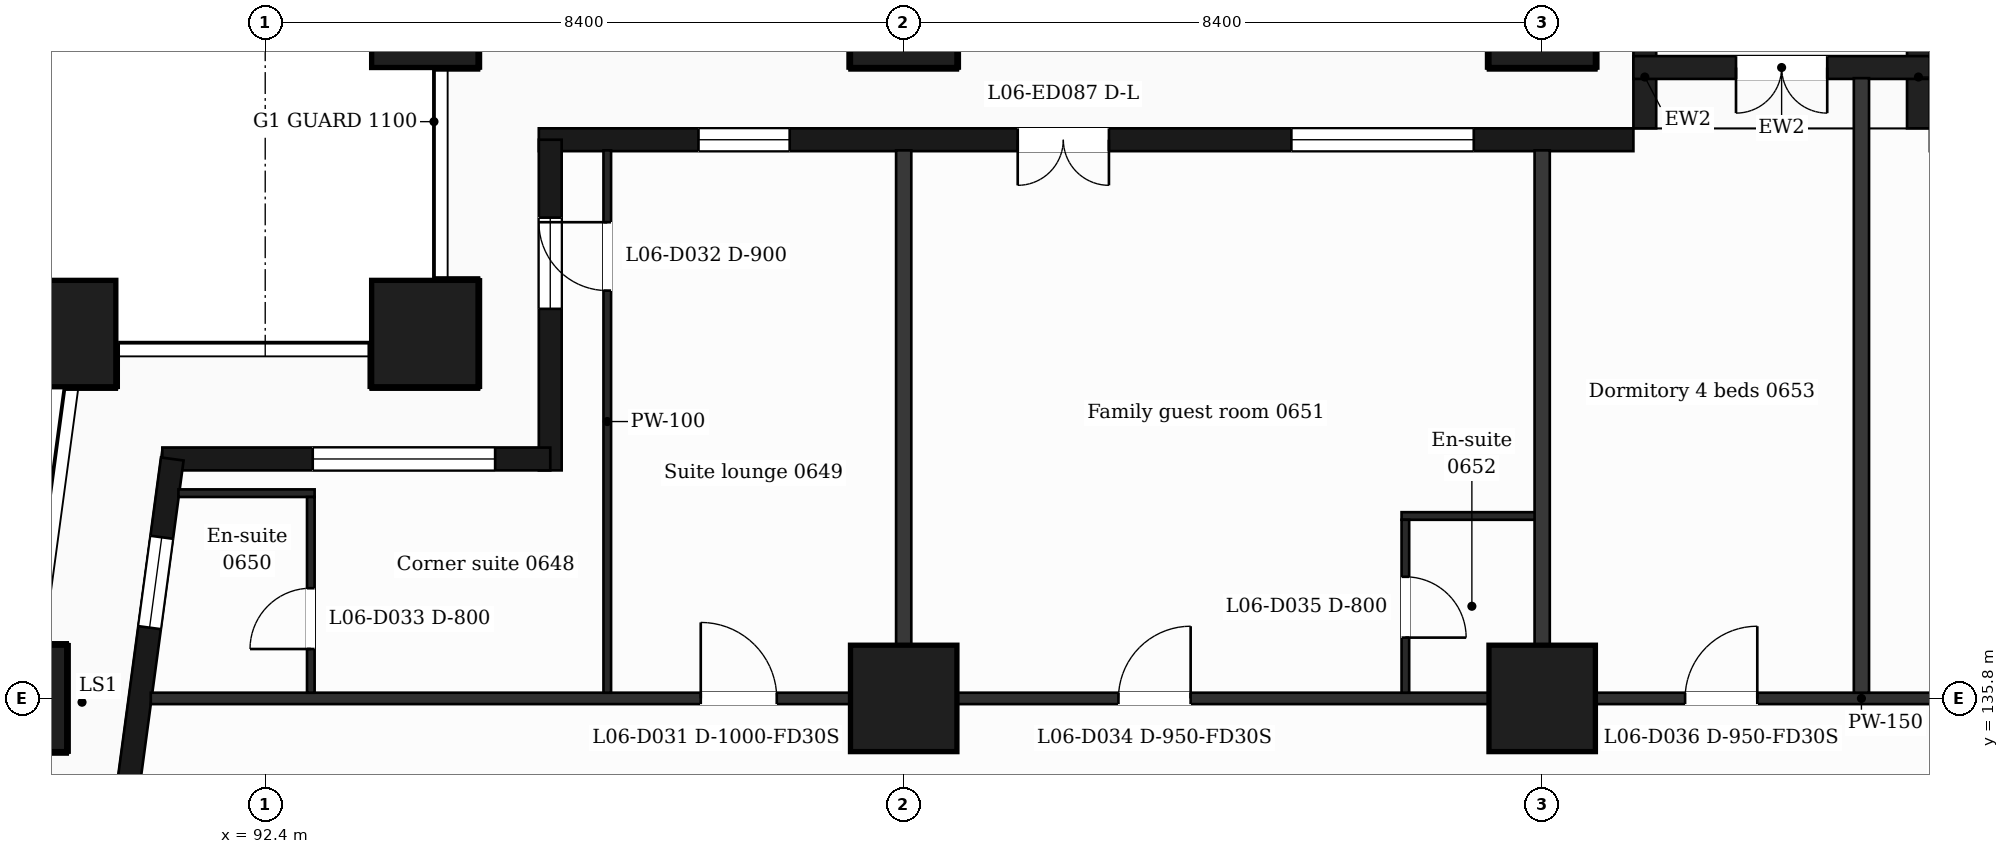
"""IFC4 building model, lengths in metres.
Left out: names, types, materials, properties, quantities, classifications, styles, units other than length and angle.
Written with IfcOpenShell. Run it as: python <this file> out.ifc"""

import sys

from ifc_helpers import new_model, si_unit, direction, frame, frame_2d, origin, origin_2d, place, context, subcontext, project, spatial, rectangle, extrude, element, fill, save


model = new_model("IFC4")
c1 = context("Model", 3, precision=1e-05, world=origin(), true_north=direction((0.0, 1.0)))
c2 = subcontext(c1, "Body", "Model", "MODEL_VIEW")
j1 = project(units=[si_unit("LENGTHUNIT", "METRE"), si_unit("PLANEANGLEUNIT", "RADIAN")], contexts=[c1])
p1 = place(None, origin())
s1 = spatial("IfcSite", under=j1, at=p1, CompositionType="ELEMENT")
p2 = place(p1, origin())
s2 = spatial("IfcBuilding", under=s1, at=p2, CompositionType="ELEMENT")
p3 = place(p2, frame((0.0, 0.0, 39.0)))
s3 = spatial("IfcBuildingStorey", under=s2, at=p3, CompositionType="ELEMENT", Elevation=39.0)
for number, where, z_axis, x_axis in (
    (1, (94.5, 140.6, -0.32), (0.0, 0.0, 1.0), (1.0, 0.0, 0.0)),
    (2, (89.735, 140.6, -0.32), (0.0, 0.0, 1.0), (1.0, 0.0, 0.0)),
    (3, (100.8, 135.8, -0.32), (0.0, 0.0, 1.0), (1.0, 0.0, 0.0)),
    (4, (109.2, 135.8, -0.32), (0.0, 0.0, 1.0), (1.0, 0.0, 0.0)),
    (5, (89.088, 135.8, -0.32), (0.0, 0.0, 1.0), (1.0, 0.0, 0.0)),
    (6, (100.8, 144.8, -0.32), (0.0, 0.0, 1.0), (1.0, 0.0, 0.0)),
    (7, (109.2, 144.8, -0.32), (0.0, 0.0, 1.0), (1.0, 0.0, 0.0)),
    (8, (94.5, 144.8, -0.32), (0.0, 0.0, 1.0), (1.0, 0.0, 0.0)),
):
    element("IfcColumn", number, at=place(p3, frame(where, z_axis=z_axis, x_axis=x_axis)), inside=s3, PredefinedType="COLUMN", context=c2, shape_type="SweptSolid", body=[
        extrude(rectangle(XDim=1.4, YDim=1.4, at=origin_2d()), origin(), (0.0, 0.0, 1.0), 3.82),
    ])
p4 = place(p3, frame((110.4, 143.15, 0.0), z_axis=(0.0, 0.0, 1.0), x_axis=(-1.0, 0.0, 0.0)))
e9 = element("IfcWall", 9, at=p4, inside=s3, PredefinedType="SOLIDWALL", context=c2, shape_type="SweptSolid", body=[
    extrude(rectangle(XDim=14.4, YDim=0.3, at=frame_2d((7.2, 0.0))), origin(), (0.0, 0.0, 1.0), 3.18),
])
p5 = place(p4, frame((2.1, 0.0, 0.9)))
e10 = element("IfcOpeningElement", 10, at=p5, cuts=e9, PredefinedType="OPENING", context=c2, shape_type="SweptSolid", body=[
    extrude(rectangle(XDim=2.4, YDim=2.1, at=frame_2d((1.2, 1.05))), frame((0.0, 0.16, 0.0), z_axis=(0.0, -1.0, 0.0), x_axis=(1.0, 0.0, 0.0)), (0.0, 0.0, 1.0), 0.32),
])
p6 = place(p4, frame((6.9, 0.0, 0.0)))
e11 = element("IfcOpeningElement", 11, at=p6, cuts=e9, PredefinedType="OPENING", context=c2, shape_type="SweptSolid", body=[
    extrude(rectangle(XDim=1.2, YDim=2.4, at=frame_2d((0.6, 1.2))), frame((0.0, 0.16, 0.0), z_axis=(0.0, -1.0, 0.0), x_axis=(1.0, 0.0, 0.0)), (0.0, 0.0, 1.0), 0.32),
])
p7 = place(p4, frame((11.1, 0.0, 0.9)))
e12 = element("IfcOpeningElement", 12, at=p7, cuts=e9, PredefinedType="OPENING", context=c2, shape_type="SweptSolid", body=[
    extrude(rectangle(XDim=1.2, YDim=2.1, at=frame_2d((0.6, 1.05))), frame((0.0, 0.16, 0.0), z_axis=(0.0, -1.0, 0.0), x_axis=(1.0, 0.0, 0.0)), (0.0, 0.0, 1.0), 0.32),
])
for number, where, z_axis, x_axis in (
    (13, (114.15, 143.3, 0.0), (0.0, 0.0, 1.0), (0.0, 1.0, 0.0)),
    (14, (110.55, 143.3, 0.0), (0.0, 0.0, 1.0), (0.0, 1.0, 0.0)),
):
    element("IfcWall", number, at=place(p3, frame(where, z_axis=z_axis, x_axis=x_axis)), inside=s3, PredefinedType="SOLIDWALL", context=c2, shape_type="SweptSolid", body=[
        extrude(rectangle(XDim=1.35, YDim=0.3, at=frame_2d((0.675, 0.0))), origin(), (0.0, 0.0, 1.0), 3.18),
    ])
p8 = place(p3, frame((114.3, 144.1, 0.0), z_axis=(0.0, 0.0, 1.0), x_axis=(-1.0, 0.0, 0.0)))
e15 = element("IfcWall", 15, at=p8, inside=s3, PredefinedType="SOLIDWALL", context=c2, shape_type="SweptSolid", body=[
    extrude(rectangle(XDim=3.9, YDim=0.3, at=frame_2d((1.95, 0.0))), origin(), (0.0, 0.0, 1.0), 3.18),
])
p9 = place(p8, frame((1.35, 0.0, 0.0)))
e16 = element("IfcOpeningElement", 16, at=p9, cuts=e15, PredefinedType="OPENING", context=c2, shape_type="SweptSolid", body=[
    extrude(rectangle(XDim=1.2, YDim=2.4, at=frame_2d((0.6, 1.2))), frame((0.0, 0.16, 0.0), z_axis=(0.0, -1.0, 0.0), x_axis=(1.0, 0.0, 0.0)), (0.0, 0.0, 1.0), 0.32),
])
p10 = place(p3, frame((96.15, 143.15, 0.0), z_axis=(0.0, 0.0, 1.0), x_axis=(0.0, -1.0, 0.0)))
e17 = element("IfcWall", 17, at=p10, inside=s3, PredefinedType="SOLIDWALL", context=c2, shape_type="SweptSolid", body=[
    extrude(rectangle(XDim=4.35, YDim=0.3, at=frame_2d((2.175, 0.0))), origin(), (0.0, 0.0, 1.0), 3.18),
])
p11 = place(p10, frame((1.025, 0.0, 0.9)))
e18 = element("IfcOpeningElement", 18, at=p11, cuts=e17, PredefinedType="OPENING", context=c2, shape_type="SweptSolid", body=[
    extrude(rectangle(XDim=1.2, YDim=2.1, at=frame_2d((0.6, 1.05))), frame((0.0, 0.16, 0.0), z_axis=(0.0, -1.0, 0.0), x_axis=(1.0, 0.0, 0.0)), (0.0, 0.0, 1.0), 0.32),
])
p12 = place(p3, frame((96.15, 138.95, 0.0), z_axis=(0.0, 0.0, 1.0), x_axis=(-1.0, 0.0, 0.0)))
e19 = element("IfcWall", 19, at=p12, inside=s3, PredefinedType="SOLIDWALL", context=c2, shape_type="SweptSolid", body=[
    extrude(rectangle(XDim=5.104, YDim=0.3, at=frame_2d((2.552, 0.0))), origin(), (0.0, 0.0, 1.0), 3.18),
])
p13 = place(p12, frame((0.725, 0.0, 0.9)))
e20 = element("IfcOpeningElement", 20, at=p13, cuts=e19, PredefinedType="OPENING", context=c2, shape_type="SweptSolid", body=[
    extrude(rectangle(XDim=2.4, YDim=2.1, at=frame_2d((1.2, 1.05))), frame((0.0, 0.16, 0.0), z_axis=(0.0, -1.0, 0.0), x_axis=(1.0, 0.0, 0.0)), (0.0, 0.0, 1.0), 0.32),
])
p14 = place(p3, frame((91.177, 138.95, 0.0), z_axis=(0.0, 0.0, 1.0), x_axis=(-0.133426664613, -0.991058689065, 0.0)))
e21 = element("IfcWall", 21, at=p14, inside=s3, PredefinedType="SOLIDWALL", context=c2, shape_type="SweptSolid", body=[
    extrude(rectangle(XDim=6.609, YDim=0.3, at=frame_2d((3.305, 0.0))), origin(), (0.0, 0.0, 1.0), 3.18),
])
p15 = place(p14, frame((1.039, 0.0, 0.9)))
e22 = element("IfcOpeningElement", 22, at=p15, cuts=e21, PredefinedType="OPENING", context=c2, shape_type="SweptSolid", body=[
    extrude(rectangle(XDim=1.2, YDim=2.1, at=frame_2d((0.6, 1.05))), frame((0.0, 0.16, 0.0), z_axis=(0.0, -1.0, 0.0), x_axis=(1.0, 0.0, 0.0)), (0.0, 0.0, 1.0), 0.32),
])
p16 = place(p14, frame((4.294, 0.0, 0.0)))
e23 = element("IfcOpeningElement", 23, at=p16, cuts=e21, PredefinedType="OPENING", context=c2, shape_type="SweptSolid", body=[
    extrude(rectangle(XDim=1.2, YDim=2.4, at=frame_2d((0.6, 1.2))), frame((0.0, 0.16, 0.0), z_axis=(0.0, -1.0, 0.0), x_axis=(1.0, 0.0, 0.0)), (0.0, 0.0, 1.0), 0.32),
])
p17 = place(p3, frame((90.895, 135.8, 0.0), z_axis=(0.0, 0.0, 1.0), x_axis=(1.0, 0.0, 0.0)))
e24 = element("IfcWall", 24, at=p17, inside=s3, PredefinedType="PARTITIONING", context=c2, shape_type="SweptSolid", body=[
    extrude(rectangle(XDim=45.011, YDim=0.15, at=frame_2d((22.505, 0.0))), origin(), (0.0, 0.0, 1.0), 3.18),
])
p18 = place(p17, frame((7.235, 0.0, 0.0)))
e25 = element("IfcOpeningElement", 25, at=p18, cuts=e24, PredefinedType="OPENING", context=c2, shape_type="SweptSolid", body=[
    extrude(rectangle(XDim=1.0, YDim=2.1, at=frame_2d((0.5, 1.05))), frame((0.0, 0.085, 0.0), z_axis=(0.0, -1.0, 0.0), x_axis=(1.0, 0.0, 0.0)), (0.0, 0.0, 1.0), 0.17),
])
p19 = place(p17, frame((12.73, 0.0, 0.0)))
e26 = element("IfcOpeningElement", 26, at=p19, cuts=e24, PredefinedType="OPENING", context=c2, shape_type="SweptSolid", body=[
    extrude(rectangle(XDim=0.95, YDim=2.1, at=frame_2d((0.475, 1.05))), frame((0.0, 0.085, 0.0), z_axis=(0.0, -1.0, 0.0), x_axis=(1.0, 0.0, 0.0)), (0.0, 0.0, 1.0), 0.17),
])
p20 = place(p17, frame((20.185, 0.0, 0.0)))
e27 = element("IfcOpeningElement", 27, at=p20, cuts=e24, PredefinedType="OPENING", context=c2, shape_type="SweptSolid", body=[
    extrude(rectangle(XDim=0.95, YDim=2.1, at=frame_2d((0.475, 1.05))), frame((0.0, 0.085, 0.0), z_axis=(0.0, -1.0, 0.0), x_axis=(1.0, 0.0, 0.0)), (0.0, 0.0, 1.0), 0.17),
])
p21 = place(p17, frame((24.531, 0.0, 0.0)))
e28 = element("IfcOpeningElement", 28, at=p21, cuts=e24, PredefinedType="OPENING", context=c2, shape_type="SweptSolid", body=[
    extrude(rectangle(XDim=1.0, YDim=2.1, at=frame_2d((0.5, 1.05))), frame((0.0, 0.085, 0.0), z_axis=(0.0, -1.0, 0.0), x_axis=(1.0, 0.0, 0.0)), (0.0, 0.0, 1.0), 0.17),
])
p22 = place(p17, frame((39.814, 0.0, 0.0)))
e29 = element("IfcOpeningElement", 29, at=p22, cuts=e24, PredefinedType="OPENING", context=c2, shape_type="SweptSolid", body=[
    extrude(rectangle(XDim=0.95, YDim=2.1, at=frame_2d((0.475, 1.05))), frame((0.0, 0.085, 0.0), z_axis=(0.0, -1.0, 0.0), x_axis=(1.0, 0.0, 0.0)), (0.0, 0.0, 1.0), 0.17),
])
p23 = place(p3, frame((107.35, 138.2, 0.0), z_axis=(0.0, 0.0, 1.0), x_axis=(1.0, 0.0, 0.0)))
e30 = element("IfcWall", 30, at=p23, inside=s3, PredefinedType="PARTITIONING", context=c2, shape_type="SweptSolid", body=[
    extrude(rectangle(XDim=1.85, YDim=0.1, at=frame_2d((0.925, 0.0))), origin(), (0.0, 0.0, 1.0), 3.18),
])
p24 = place(p3, frame((91.258, 138.5, 0.0), z_axis=(0.0, 0.0, 1.0), x_axis=(1.0, 0.0, 0.0)))
e31 = element("IfcWall", 31, at=p24, inside=s3, PredefinedType="PARTITIONING", context=c2, shape_type="SweptSolid", body=[
    extrude(rectangle(XDim=1.792, YDim=0.1, at=frame_2d((0.896, 0.0))), origin(), (0.0, 0.0, 1.0), 3.18),
])
p25 = place(p3, frame((93.0, 135.875, 0.0), z_axis=(0.0, 0.0, 1.0), x_axis=(0.0, 1.0, 0.0)))
e32 = element("IfcWall", 32, at=p25, inside=s3, PredefinedType="PARTITIONING", context=c2, shape_type="SweptSolid", body=[
    extrude(rectangle(XDim=2.575, YDim=0.1, at=frame_2d((1.288, 0.0))), origin(), (0.0, 0.0, 1.0), 3.18),
])
p26 = place(p25, frame((0.575, 0.0, 0.0)))
e33 = element("IfcOpeningElement", 33, at=p26, cuts=e32, PredefinedType="OPENING", context=c2, shape_type="SweptSolid", body=[
    extrude(rectangle(XDim=0.8, YDim=2.1, at=frame_2d((0.4, 1.05))), frame((0.0, 0.06, 0.0), z_axis=(0.0, -1.0, 0.0), x_axis=(1.0, 0.0, 0.0)), (0.0, 0.0, 1.0), 0.12),
])
p27 = place(p3, frame((96.9, 135.875, 0.0), z_axis=(0.0, 0.0, 1.0), x_axis=(0.0, 1.0, 0.0)))
e34 = element("IfcWall", 34, at=p27, inside=s3, PredefinedType="PARTITIONING", context=c2, shape_type="SweptSolid", body=[
    extrude(rectangle(XDim=7.135, YDim=0.1, at=frame_2d((3.567, 0.0))), origin(), (0.0, 0.0, 1.0), 3.18),
])
p28 = place(p27, frame((5.29, 0.0, 0.0)))
e35 = element("IfcOpeningElement", 35, at=p28, cuts=e34, PredefinedType="OPENING", context=c2, shape_type="SweptSolid", body=[
    extrude(rectangle(XDim=0.9, YDim=2.1, at=frame_2d((0.45, 1.05))), frame((0.0, 0.06, 0.0), z_axis=(0.0, -1.0, 0.0), x_axis=(1.0, 0.0, 0.0)), (0.0, 0.0, 1.0), 0.12),
])
p29 = place(p3, frame((100.8, 135.875, 0.0), z_axis=(0.0, 0.0, 1.0), x_axis=(0.0, 1.0, 0.0)))
e36 = element("IfcWall", 36, at=p29, inside=s3, PredefinedType="PARTITIONING", context=c2, shape_type="SweptSolid", body=[
    extrude(rectangle(XDim=7.135, YDim=0.2, at=frame_2d((3.567, 0.0))), origin(), (0.0, 0.0, 1.0), 3.18),
])
p30 = place(p3, frame((107.4, 135.875, 0.0), z_axis=(0.0, 0.0, 1.0), x_axis=(0.0, 1.0, 0.0)))
e37 = element("IfcWall", 37, at=p30, inside=s3, PredefinedType="PARTITIONING", context=c2, shape_type="SweptSolid", body=[
    extrude(rectangle(XDim=2.275, YDim=0.1, at=frame_2d((1.137, 0.0))), origin(), (0.0, 0.0, 1.0), 3.18),
])
p31 = place(p30, frame((0.725, 0.0, 0.0)))
e38 = element("IfcOpeningElement", 38, at=p31, cuts=e37, PredefinedType="OPENING", context=c2, shape_type="SweptSolid", body=[
    extrude(rectangle(XDim=0.8, YDim=2.1, at=frame_2d((0.4, 1.05))), frame((0.0, 0.06, 0.0), z_axis=(0.0, -1.0, 0.0), x_axis=(1.0, 0.0, 0.0)), (0.0, 0.0, 1.0), 0.12),
])
p32 = place(p3, frame((109.2, 135.875, 0.0), z_axis=(0.0, 0.0, 1.0), x_axis=(0.0, 1.0, 0.0)))
e39 = element("IfcWall", 39, at=p32, inside=s3, PredefinedType="PARTITIONING", context=c2, shape_type="SweptSolid", body=[
    extrude(rectangle(XDim=7.135, YDim=0.2, at=frame_2d((3.567, 0.0))), origin(), (0.0, 0.0, 1.0), 3.18),
])
p33 = place(p3, frame((113.4, 135.875, 0.0), z_axis=(0.0, 0.0, 1.0), x_axis=(0.0, 1.0, 0.0)))
e40 = element("IfcWall", 40, at=p33, inside=s3, PredefinedType="PARTITIONING", context=c2, shape_type="SweptSolid", body=[
    extrude(rectangle(XDim=8.085, YDim=0.2, at=frame_2d((4.042, 0.0))), origin(), (0.0, 0.0, 1.0), 3.18),
])
p34 = place(p5, origin())
e41 = element("IfcWindow", 41, at=p34, inside=s3, PartitioningType="SINGLE_PANEL", PredefinedType="WINDOW", context=c2, shape_type="SweptSolid", body=[
    extrude(rectangle(XDim=2.4, YDim=2.1, at=frame_2d((1.2, 1.05))), frame((0.0, 0.03, 0.0), z_axis=(0.0, -1.0, 0.0), x_axis=(1.0, 0.0, 0.0)), (0.0, 0.0, 1.0), 0.06),
])
fill(e10, e41)
p35 = place(p6, origin())
e42 = element("IfcDoor", 42, at=p35, inside=s3, OperationType="DOUBLE_DOOR_SINGLE_SWING", PredefinedType="DOOR", context=c2, shape_type="SweptSolid", body=[
    extrude(rectangle(XDim=1.2, YDim=2.4, at=frame_2d((0.6, 1.2))), frame((0.0, 0.025, 0.0), z_axis=(0.0, -1.0, 0.0), x_axis=(1.0, 0.0, 0.0)), (0.0, 0.0, 1.0), 0.05),
])
fill(e11, e42)
p36 = place(p7, origin())
e43 = element("IfcWindow", 43, at=p36, inside=s3, PartitioningType="SINGLE_PANEL", PredefinedType="WINDOW", context=c2, shape_type="SweptSolid", body=[
    extrude(rectangle(XDim=1.2, YDim=2.1, at=frame_2d((0.6, 1.05))), frame((0.0, 0.03, 0.0), z_axis=(0.0, -1.0, 0.0), x_axis=(1.0, 0.0, 0.0)), (0.0, 0.0, 1.0), 0.06),
])
fill(e12, e43)
p37 = place(p9, origin())
e44 = element("IfcDoor", 44, at=p37, inside=s3, OperationType="DOUBLE_DOOR_SINGLE_SWING", PredefinedType="DOOR", context=c2, shape_type="SweptSolid", body=[
    extrude(rectangle(XDim=1.2, YDim=2.4, at=frame_2d((0.6, 1.2))), frame((0.0, 0.025, 0.0), z_axis=(0.0, -1.0, 0.0), x_axis=(1.0, 0.0, 0.0)), (0.0, 0.0, 1.0), 0.05),
])
fill(e16, e44)
p38 = place(p11, origin())
e45 = element("IfcWindow", 45, at=p38, inside=s3, PartitioningType="SINGLE_PANEL", PredefinedType="WINDOW", context=c2, shape_type="SweptSolid", body=[
    extrude(rectangle(XDim=1.2, YDim=2.1, at=frame_2d((0.6, 1.05))), frame((0.0, 0.03, 0.0), z_axis=(0.0, -1.0, 0.0), x_axis=(1.0, 0.0, 0.0)), (0.0, 0.0, 1.0), 0.06),
])
fill(e18, e45)
p39 = place(p13, origin())
e46 = element("IfcWindow", 46, at=p39, inside=s3, PartitioningType="SINGLE_PANEL", PredefinedType="WINDOW", context=c2, shape_type="SweptSolid", body=[
    extrude(rectangle(XDim=2.4, YDim=2.1, at=frame_2d((1.2, 1.05))), frame((0.0, 0.03, 0.0), z_axis=(0.0, -1.0, 0.0), x_axis=(1.0, 0.0, 0.0)), (0.0, 0.0, 1.0), 0.06),
])
fill(e20, e46)
p40 = place(p15, origin())
e47 = element("IfcWindow", 47, at=p40, inside=s3, PartitioningType="SINGLE_PANEL", PredefinedType="WINDOW", context=c2, shape_type="SweptSolid", body=[
    extrude(rectangle(XDim=1.2, YDim=2.1, at=frame_2d((0.6, 1.05))), frame((0.0, 0.03, 0.0), z_axis=(0.0, -1.0, 0.0), x_axis=(1.0, 0.0, 0.0)), (0.0, 0.0, 1.0), 0.06),
])
fill(e22, e47)
p41 = place(p18, origin())
e48 = element("IfcDoor", 48, at=p41, inside=s3, OperationType="SINGLE_SWING_LEFT", PredefinedType="DOOR", context=c2, shape_type="SweptSolid", body=[
    extrude(rectangle(XDim=1.0, YDim=2.1, at=frame_2d((0.5, 1.05))), frame((0.0, 0.025, 0.0), z_axis=(0.0, -1.0, 0.0), x_axis=(1.0, 0.0, 0.0)), (0.0, 0.0, 1.0), 0.05),
])
fill(e25, e48)
p42 = place(p28, origin())
e49 = element("IfcDoor", 49, at=p42, inside=s3, OperationType="SINGLE_SWING_RIGHT", PredefinedType="DOOR", context=c2, shape_type="SweptSolid", body=[
    extrude(rectangle(XDim=0.9, YDim=2.1, at=frame_2d((0.45, 1.05))), frame((0.0, 0.025, 0.0), z_axis=(0.0, -1.0, 0.0), x_axis=(1.0, 0.0, 0.0)), (0.0, 0.0, 1.0), 0.05),
])
fill(e35, e49)
p43 = place(p26, origin())
e50 = element("IfcDoor", 50, at=p43, inside=s3, OperationType="SINGLE_SWING_LEFT", PredefinedType="DOOR", context=c2, shape_type="SweptSolid", body=[
    extrude(rectangle(XDim=0.8, YDim=2.1, at=frame_2d((0.4, 1.05))), frame((0.0, 0.025, 0.0), z_axis=(0.0, -1.0, 0.0), x_axis=(1.0, 0.0, 0.0)), (0.0, 0.0, 1.0), 0.05),
])
fill(e33, e50)
p44 = place(p19, origin())
e51 = element("IfcDoor", 51, at=p44, inside=s3, OperationType="SINGLE_SWING_RIGHT", PredefinedType="DOOR", context=c2, shape_type="SweptSolid", body=[
    extrude(rectangle(XDim=0.95, YDim=2.1, at=frame_2d((0.475, 1.05))), frame((0.0, 0.025, 0.0), z_axis=(0.0, -1.0, 0.0), x_axis=(1.0, 0.0, 0.0)), (0.0, 0.0, 1.0), 0.05),
])
fill(e26, e51)
p45 = place(p31, origin())
e52 = element("IfcDoor", 52, at=p45, inside=s3, OperationType="SINGLE_SWING_LEFT", PredefinedType="DOOR", context=c2, shape_type="SweptSolid", body=[
    extrude(rectangle(XDim=0.8, YDim=2.1, at=frame_2d((0.4, 1.05))), frame((0.0, 0.025, 0.0), z_axis=(0.0, -1.0, 0.0), x_axis=(1.0, 0.0, 0.0)), (0.0, 0.0, 1.0), 0.05),
])
fill(e38, e52)
p46 = place(p20, origin())
e53 = element("IfcDoor", 53, at=p46, inside=s3, OperationType="SINGLE_SWING_RIGHT", PredefinedType="DOOR", context=c2, shape_type="SweptSolid", body=[
    extrude(rectangle(XDim=0.95, YDim=2.1, at=frame_2d((0.475, 1.05))), frame((0.0, 0.025, 0.0), z_axis=(0.0, -1.0, 0.0), x_axis=(1.0, 0.0, 0.0)), (0.0, 0.0, 1.0), 0.05),
])
fill(e27, e53)
save(model, sys.argv[1])
